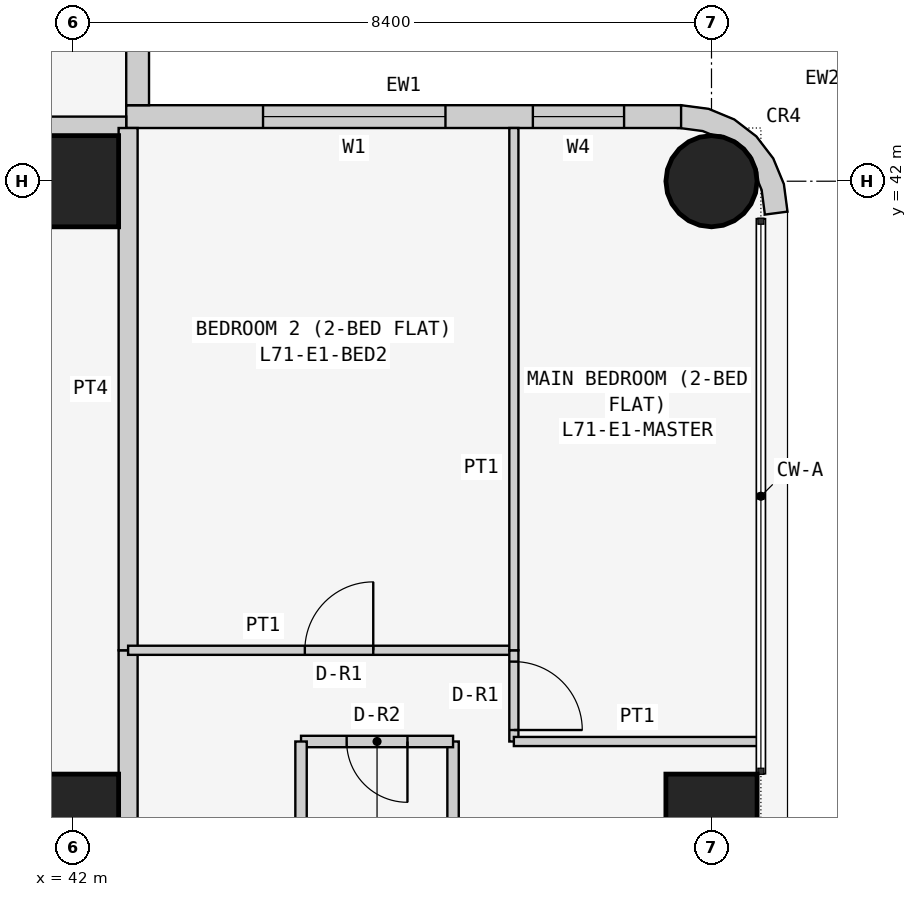
"""IFC4 building model, lengths in metres.
Left out: names, types, materials, properties, quantities, classifications, styles, units other than length and angle.
Written with IfcOpenShell. Run it as: python <this file> out.ifc"""

import sys

from ifc_helpers import new_model, si_unit, direction, frame, frame_2d, origin, origin_2d, place, context, subcontext, project, spatial, polyline, rectangle, circle, outline, extrude, element, fill, save


model = new_model("IFC4")
c1 = context("Model", 3, precision=1e-05, world=origin(), true_north=direction((0.0, 1.0)))
c2 = subcontext(c1, "Body", "Model", "MODEL_VIEW")
j1 = project(units=[si_unit("LENGTHUNIT", "METRE"), si_unit("PLANEANGLEUNIT", "RADIAN")], contexts=[c1])
p1 = place(None, origin())
s1 = spatial("IfcSite", under=j1, at=p1, CompositionType="ELEMENT")
p2 = place(p1, origin())
s2 = spatial("IfcBuilding", under=s1, at=p2, CompositionType="ELEMENT")
p3 = place(p2, frame((0.0, 0.0, 272.1)))
s3 = spatial("IfcBuildingStorey", under=s2, at=p3, CompositionType="ELEMENT", Elevation=272.1)
for number, where, z_axis, x_axis in (
    (1, (42.0, 33.6, 0.0), (0.0, 0.0, 1.0), (1.0, 0.0, 0.0)),
    (2, (42.0, 42.0, 0.0), (0.0, 0.0, 1.0), (1.0, 0.0, 0.0)),
    (3, (50.4, 33.6, 0.0), (0.0, 0.0, 1.0), (1.0, 0.0, 0.0)),
):
    element("IfcColumn", number, at=place(p3, frame(where, z_axis=z_axis, x_axis=x_axis)), inside=s3, PredefinedType="COLUMN", context=c2, shape_type="SweptSolid", body=[
        extrude(rectangle(XDim=1.2, YDim=1.2, at=origin_2d()), origin(), (0.0, 0.0, 1.0), 3.6),
    ])
p4 = place(p3, frame((50.4, 42.0, 0.0), z_axis=(0.0, 0.0, 1.0), x_axis=(1.0, 0.0, 0.0)))
e4 = element("IfcColumn", 4, at=p4, inside=s3, PredefinedType="COLUMN", context=c2, shape_type="SweptSolid", body=[
    extrude(circle(Radius=0.6, at=origin_2d()), origin(), (0.0, 0.0, 1.0), 3.6),
])
p5 = place(p3, frame((50.0, 42.85, 0.0), z_axis=(0.0, 0.0, 1.0), x_axis=(-1.0, 0.0, 0.0)))
e5 = element("IfcWall", 5, at=p5, inside=s3, PredefinedType="SOLIDWALL", context=c2, shape_type="SweptSolid", body=[
    extrude(rectangle(XDim=7.3, YDim=0.3, at=frame_2d((3.65, 0.0))), origin(), (0.0, 0.0, 1.0), 3.45),
])
p6 = place(p5, frame((3.1, 0.0, 0.9)))
e6 = element("IfcOpeningElement", 6, at=p6, cuts=e5, PredefinedType="OPENING", context=c2, shape_type="SweptSolid", body=[
    extrude(rectangle(XDim=2.4, YDim=1.5, at=frame_2d((1.2, 0.75))), frame((0.0, 0.16, 0.0), z_axis=(0.0, -1.0, 0.0), x_axis=(1.0, 0.0, 0.0)), (0.0, 0.0, 1.0), 0.32),
])
p7 = place(p5, frame((0.75, 0.0, 0.9)))
e7 = element("IfcOpeningElement", 7, at=p7, cuts=e5, PredefinedType="OPENING", context=c2, shape_type="SweptSolid", body=[
    extrude(rectangle(XDim=1.2, YDim=1.5, at=frame_2d((0.6, 0.75))), frame((0.0, 0.16, 0.0), z_axis=(0.0, -1.0, 0.0), x_axis=(1.0, 0.0, 0.0)), (0.0, 0.0, 1.0), 0.32),
])
p8 = place(p3, frame((42.85, 43.0, 0.0), z_axis=(0.0, 0.0, 1.0), x_axis=(0.0, 1.0, 0.0)))
e8 = element("IfcWall", 8, at=p8, inside=s3, PredefinedType="SOLIDWALL", context=c2, shape_type="SweptSolid", body=[
    extrude(rectangle(XDim=7.0, YDim=0.3, at=frame_2d((3.5, 0.0))), origin(), (0.0, 0.0, 1.0), 3.45),
])
p9 = place(p8, frame((1.5, 0.0, 0.9)))
e9 = element("IfcOpeningElement", 9, at=p9, cuts=e8, PredefinedType="OPENING", context=c2, shape_type="SweptSolid", body=[
    extrude(rectangle(XDim=2.4, YDim=1.5, at=frame_2d((1.2, 0.75))), frame((0.0, 0.16, 0.0), z_axis=(0.0, -1.0, 0.0), x_axis=(1.0, 0.0, 0.0)), (0.0, 0.0, 1.0), 0.32),
])
p10 = place(p8, frame((5.05, 0.0, 0.9)))
e10 = element("IfcOpeningElement", 10, at=p10, cuts=e8, PredefinedType="OPENING", context=c2, shape_type="SweptSolid", body=[
    extrude(rectangle(XDim=1.2, YDim=1.5, at=frame_2d((0.6, 0.75))), frame((0.0, 0.16, 0.0), z_axis=(0.0, -1.0, 0.0), x_axis=(1.0, 0.0, 0.0)), (0.0, 0.0, 1.0), 0.32),
])
p11 = place(p3, frame((50.976, 41.638, 0.0), z_axis=(0.0, 0.0, 1.0), x_axis=(0.707106781187, 0.707106781187, 0.0)))
e11 = element("IfcWall", 11, at=p11, inside=s3, PredefinedType="SOLIDWALL", context=c2, shape_type="SweptSolid", body=[
    extrude(outline(polyline([(0.233, 0.114), (0.047, -0.129), (0.033, -0.143), (0.273, -0.327), (0.495, -0.037), (0.635, 0.301), (0.683, 0.663), (0.635, 1.025), (0.495, 1.363), (0.273, 1.653), (0.033, 1.469), (0.047, 1.455), (0.233, 1.212), (0.292, 1.069), (0.358, 1.003), (0.449, 0.782), (0.449, 0.543), (0.358, 0.322), (0.292, 0.257), (0.233, 0.114)])), origin(), (0.0, 0.0, 1.0), 3.45),
])
p12 = place(p3, frame((35.829, 42.725, 0.0), z_axis=(0.0, 0.0, 1.0), x_axis=(1.0, 0.0, 0.0)))
e12 = element("IfcWall", 12, at=p12, inside=s3, PredefinedType="PARTITIONING", context=c2, shape_type="SweptSolid", body=[
    extrude(rectangle(XDim=6.871, YDim=0.25, at=frame_2d((3.436, 0.0))), origin(), (0.0, 0.0, 1.0), 3.45),
])
p13 = place(p3, frame((42.725, 35.829, 0.0), z_axis=(0.0, 0.0, 1.0), x_axis=(0.0, -1.0, 0.0)))
e13 = element("IfcWall", 13, at=p13, inside=s3, PredefinedType="PARTITIONING", context=c2, shape_type="SweptSolid", body=[
    extrude(rectangle(XDim=6.429, YDim=0.25, at=frame_2d((3.215, 0.0))), origin(), (0.0, 0.0, 1.0), 3.45),
])
p14 = place(p13, frame((4.929, 0.0, 0.0)))
e14 = element("IfcOpeningElement", 14, at=p14, cuts=e13, PredefinedType="OPENING", context=c2, shape_type="SweptSolid", body=[
    extrude(rectangle(XDim=1.0, YDim=2.1, at=frame_2d((0.5, 1.05))), frame((0.0, 0.135, 0.0), z_axis=(0.0, -1.0, 0.0), x_axis=(1.0, 0.0, 0.0)), (0.0, 0.0, 1.0), 0.27),
])
p15 = place(p3, frame((42.725, 42.7, 0.0), z_axis=(0.0, 0.0, 1.0), x_axis=(0.0, -1.0, 0.0)))
e15 = element("IfcWall", 15, at=p15, inside=s3, PredefinedType="PARTITIONING", context=c2, shape_type="SweptSolid", body=[
    extrude(rectangle(XDim=6.871, YDim=0.25, at=frame_2d((3.436, 0.0))), origin(), (0.0, 0.0, 1.0), 3.45),
])
p16 = place(p3, frame((47.0, 29.4, 0.0), z_axis=(0.0, 0.0, 1.0), x_axis=(0.0, 1.0, 0.0)))
e16 = element("IfcWall", 16, at=p16, inside=s3, PredefinedType="PARTITIONING", context=c2, shape_type="SweptSolid", body=[
    extrude(rectangle(XDim=5.229, YDim=0.15, at=frame_2d((2.615, 0.0))), origin(), (0.0, 0.0, 1.0), 3.45),
])
p17 = place(p3, frame((47.0, 34.629, 0.0), z_axis=(0.0, 0.0, 1.0), x_axis=(-1.0, 0.0, 0.0)))
e17 = element("IfcWall", 17, at=p17, inside=s3, PredefinedType="PARTITIONING", context=c2, shape_type="SweptSolid", body=[
    extrude(rectangle(XDim=2.0, YDim=0.15, at=frame_2d((1.0, 0.0))), origin(), (0.0, 0.0, 1.0), 3.45),
])
p18 = place(p17, frame((0.6, 0.0, 0.0)))
e18 = element("IfcOpeningElement", 18, at=p18, cuts=e17, PredefinedType="OPENING", context=c2, shape_type="SweptSolid", body=[
    extrude(rectangle(XDim=0.8, YDim=2.1, at=frame_2d((0.4, 1.05))), frame((0.0, 0.085, 0.0), z_axis=(0.0, -1.0, 0.0), x_axis=(1.0, 0.0, 0.0)), (0.0, 0.0, 1.0), 0.17),
])
p19 = place(p3, frame((45.0, 34.629, 0.0), z_axis=(0.0, 0.0, 1.0), x_axis=(0.0, -1.0, 0.0)))
e19 = element("IfcWall", 19, at=p19, inside=s3, PredefinedType="PARTITIONING", context=c2, shape_type="SweptSolid", body=[
    extrude(rectangle(XDim=5.229, YDim=0.15, at=frame_2d((2.615, 0.0))), origin(), (0.0, 0.0, 1.0), 3.45),
])
p20 = place(p3, frame((42.725, 35.829, 0.0), z_axis=(0.0, 0.0, 1.0), x_axis=(1.0, 0.0, 0.0)))
e20 = element("IfcWall", 20, at=p20, inside=s3, PredefinedType="PARTITIONING", context=c2, shape_type="SweptSolid", body=[
    extrude(rectangle(XDim=5.075, YDim=0.12, at=frame_2d((2.538, 0.0))), origin(), (0.0, 0.0, 1.0), 3.45),
])
p21 = place(p20, frame((2.325, 0.0, 0.0)))
e21 = element("IfcOpeningElement", 21, at=p21, cuts=e20, PredefinedType="OPENING", context=c2, shape_type="SweptSolid", body=[
    extrude(rectangle(XDim=0.9, YDim=2.1, at=frame_2d((0.45, 1.05))), frame((0.0, 0.07, 0.0), z_axis=(0.0, -1.0, 0.0), x_axis=(1.0, 0.0, 0.0)), (0.0, 0.0, 1.0), 0.14),
])
p22 = place(p3, frame((47.8, 35.829, 0.0), z_axis=(0.0, 0.0, 1.0), x_axis=(0.0, -1.0, 0.0)))
e22 = element("IfcWall", 22, at=p22, inside=s3, PredefinedType="PARTITIONING", context=c2, shape_type="SweptSolid", body=[
    extrude(rectangle(XDim=1.2, YDim=0.12, at=frame_2d((0.6, 0.0))), origin(), (0.0, 0.0, 1.0), 3.45),
])
p23 = place(p22, frame((0.149, 0.0, 0.0)))
e23 = element("IfcOpeningElement", 23, at=p23, cuts=e22, PredefinedType="OPENING", context=c2, shape_type="SweptSolid", body=[
    extrude(rectangle(XDim=0.9, YDim=2.1, at=frame_2d((0.45, 1.05))), frame((0.0, 0.07, 0.0), z_axis=(0.0, -1.0, 0.0), x_axis=(1.0, 0.0, 0.0)), (0.0, 0.0, 1.0), 0.14),
])
p24 = place(p3, frame((47.8, 34.629, 0.0), z_axis=(0.0, 0.0, 1.0), x_axis=(1.0, 0.0, 0.0)))
e24 = element("IfcWall", 24, at=p24, inside=s3, PredefinedType="PARTITIONING", context=c2, shape_type="SweptSolid", body=[
    extrude(rectangle(XDim=3.25, YDim=0.12, at=frame_2d((1.625, 0.0))), origin(), (0.0, 0.0, 1.0), 3.45),
])
p25 = place(p3, frame((47.8, 35.829, 0.0), z_axis=(0.0, 0.0, 1.0), x_axis=(0.0, 1.0, 0.0)))
e25 = element("IfcWall", 25, at=p25, inside=s3, PredefinedType="PARTITIONING", context=c2, shape_type="SweptSolid", body=[
    extrude(rectangle(XDim=6.871, YDim=0.12, at=frame_2d((3.436, 0.0))), origin(), (0.0, 0.0, 1.0), 3.45),
])
p26 = place(p6, origin())
e26 = element("IfcWindow", 26, at=p26, inside=s3, PartitioningType="SINGLE_PANEL", PredefinedType="WINDOW", context=c2, shape_type="SweptSolid", body=[
    extrude(rectangle(XDim=2.4, YDim=1.5, at=frame_2d((1.2, 0.75))), frame((0.0, 0.03, 0.0), z_axis=(0.0, -1.0, 0.0), x_axis=(1.0, 0.0, 0.0)), (0.0, 0.0, 1.0), 0.06),
])
fill(e6, e26)
p27 = place(p7, origin())
e27 = element("IfcWindow", 27, at=p27, inside=s3, PartitioningType="SINGLE_PANEL", PredefinedType="WINDOW", context=c2, shape_type="SweptSolid", body=[
    extrude(rectangle(XDim=1.2, YDim=1.5, at=frame_2d((0.6, 0.75))), frame((0.0, 0.03, 0.0), z_axis=(0.0, -1.0, 0.0), x_axis=(1.0, 0.0, 0.0)), (0.0, 0.0, 1.0), 0.06),
])
fill(e7, e27)
p28 = place(p18, origin())
e28 = element("IfcDoor", 28, at=p28, inside=s3, OperationType="SINGLE_SWING_LEFT", PredefinedType="DOOR", context=c2, shape_type="SweptSolid", body=[
    extrude(rectangle(XDim=0.8, YDim=2.1, at=frame_2d((0.4, 1.05))), frame((0.0, 0.025, 0.0), z_axis=(0.0, -1.0, 0.0), x_axis=(1.0, 0.0, 0.0)), (0.0, 0.0, 1.0), 0.05),
])
fill(e18, e28)
p29 = place(p21, origin())
e29 = element("IfcDoor", 29, at=p29, inside=s3, OperationType="SINGLE_SWING_RIGHT", PredefinedType="DOOR", context=c2, shape_type="SweptSolid", body=[
    extrude(rectangle(XDim=0.9, YDim=2.1, at=frame_2d((0.45, 1.05))), frame((0.0, 0.025, 0.0), z_axis=(0.0, -1.0, 0.0), x_axis=(1.0, 0.0, 0.0)), (0.0, 0.0, 1.0), 0.05),
])
fill(e21, e29)
p30 = place(p23, origin())
e30 = element("IfcDoor", 30, at=p30, inside=s3, OperationType="SINGLE_SWING_RIGHT", PredefinedType="DOOR", context=c2, shape_type="SweptSolid", body=[
    extrude(rectangle(XDim=0.9, YDim=2.1, at=frame_2d((0.45, 1.05))), frame((0.0, 0.025, 0.0), z_axis=(0.0, -1.0, 0.0), x_axis=(1.0, 0.0, 0.0)), (0.0, 0.0, 1.0), 0.05),
])
fill(e23, e30)
save(model, sys.argv[1])
